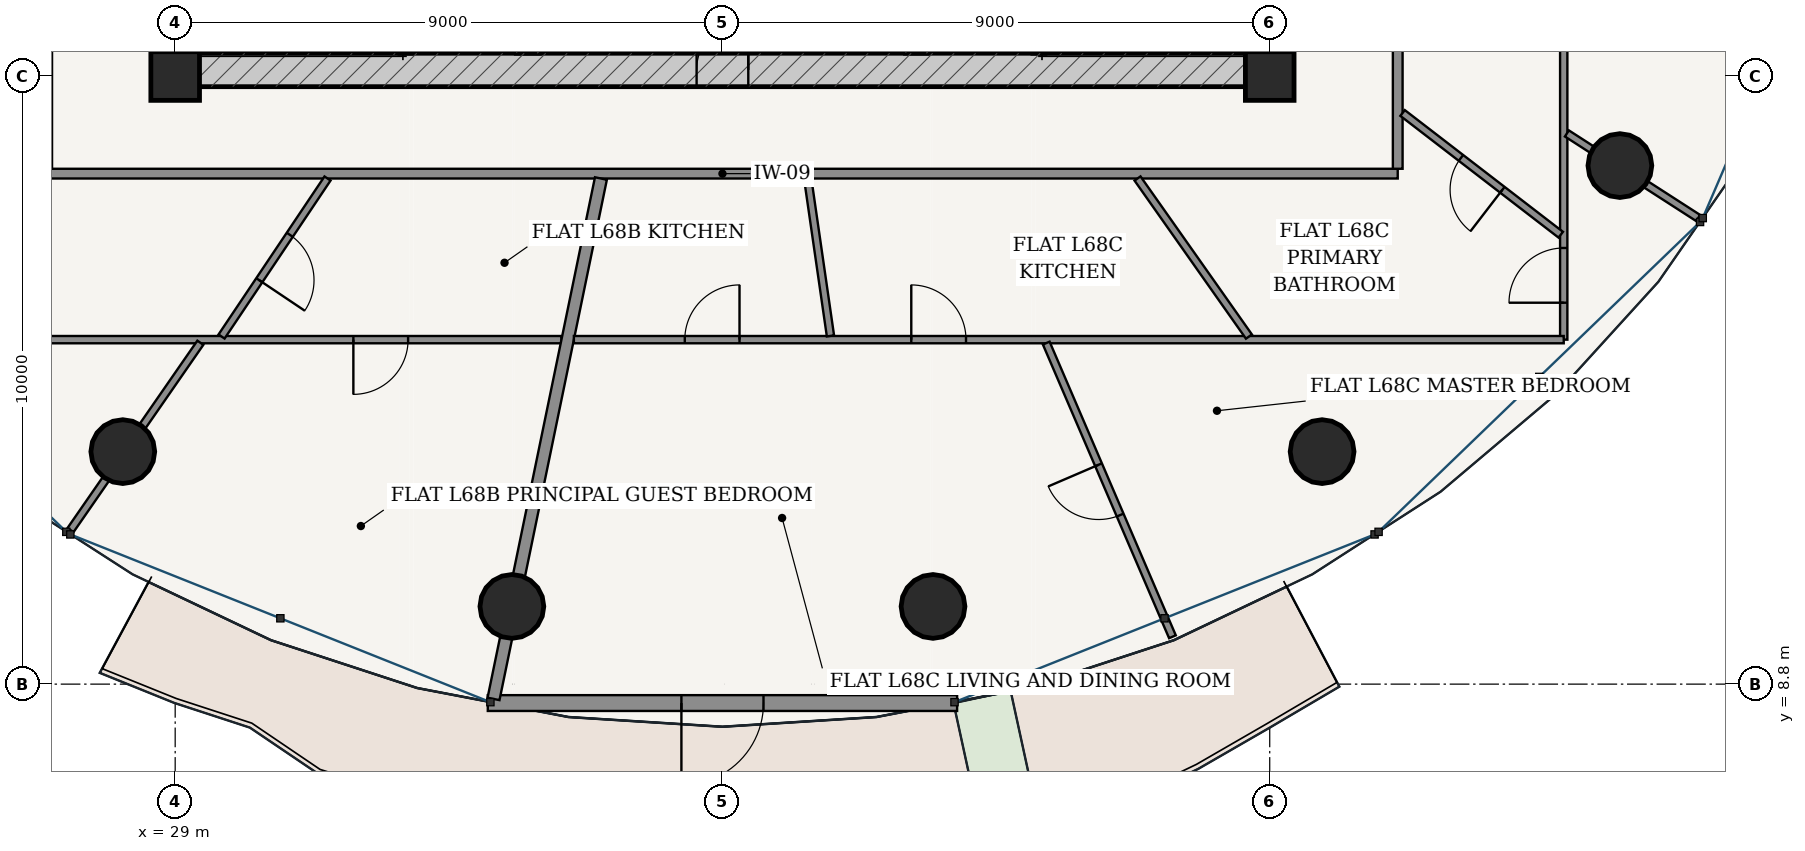
"""IFC4 building model, lengths in metres.
Left out: names, types, materials, properties, quantities, classifications, styles, units other than length and angle.
Written with IfcOpenShell. Run it as: python <this file> out.ifc"""

import sys

from ifc_helpers import new_model, si_unit, direction, frame, frame_2d, origin, origin_2d, place, context, subcontext, project, spatial, rectangle, hollow_circle, extrude, source, transform, mapped, element, fill, save


model = new_model("IFC4")
c1 = context("Model", 3, precision=1e-05, world=origin(), true_north=direction((-0.2419218956, 0.970295726276)))
c2 = subcontext(c1, "Body", "Model", "MODEL_VIEW")
j1 = project(units=[si_unit("LENGTHUNIT", "METRE"), si_unit("PLANEANGLEUNIT", "RADIAN")], contexts=[c1])
p1 = place(None, origin())
s1 = spatial("IfcSite", under=j1, at=p1, CompositionType="ELEMENT")
p2 = place(p1, origin())
s2 = spatial("IfcBuilding", under=s1, at=p2, CompositionType="ELEMENT")
p3 = place(p2, frame((0.0, 0.0, 259.45)))
s3 = spatial("IfcBuildingStorey", under=s2, at=p3, CompositionType="ELEMENT", Elevation=259.45)
for number, where, z_axis, x_axis in (
    (1, (29.0, 18.8, 0.0), (0.0, 0.0, 1.0), (1.0, 0.0, 0.0)),
    (2, (47.0, 18.8, 0.0), (0.0, 0.0, 1.0), (1.0, 0.0, 0.0)),
):
    element("IfcColumn", number, at=place(p3, frame(where, z_axis=z_axis, x_axis=x_axis)), inside=s3, PredefinedType="COLUMN", context=c2, shape_type="SweptSolid", body=[
        extrude(rectangle(XDim=0.8, YDim=0.8, at=origin_2d()), origin(), (0.0, 0.0, 1.0), 3.75),
    ])
p4 = place(p3, frame((28.825, 18.9, 0.0), z_axis=(0.0, 0.0, 1.0), x_axis=(1.0, 0.0, 0.0)))
e3 = element("IfcWall", 3, at=p4, inside=s3, PredefinedType="SHEAR", context=c2, shape_type="SweptSolid", body=[
    extrude(rectangle(XDim=18.35, YDim=0.55, at=frame_2d((9.175, 0.0))), origin(), (0.0, 0.0, 1.0), 3.49),
])
p5 = place(p4, frame((8.75, 0.0, 0.0)))
e4 = element("IfcOpeningElement", 4, at=p5, cuts=e3, PredefinedType="OPENING", context=c2, shape_type="SweptSolid", body=[
    extrude(rectangle(XDim=0.85, YDim=2.1, at=frame_2d((0.425, 1.05))), frame((0.0, 0.285, 0.0), z_axis=(0.0, -1.0, 0.0), x_axis=(1.0, 0.0, 0.0)), (0.0, 0.0, 1.0), 0.57),
])
p6 = place(p3, frame((29.1, 19.175, 0.0), z_axis=(0.0, 0.0, 1.0), x_axis=(0.0, 1.0, 0.0)))
e5 = element("IfcWall", 5, at=p6, inside=s3, PredefinedType="SHEAR", context=c2, shape_type="SweptSolid", body=[
    extrude(rectangle(XDim=15.25, YDim=0.55, at=frame_2d((7.625, 0.0))), origin(), (0.0, 0.0, 1.0), 3.49),
])
p7 = place(p6, frame((9.875, 0.0, 0.0)))
e6 = element("IfcOpeningElement", 6, at=p7, cuts=e5, PredefinedType="OPENING", context=c2, shape_type="SweptSolid", body=[
    extrude(rectangle(XDim=1.5, YDim=2.2, at=frame_2d((0.75, 1.1))), frame((0.0, 0.285, 0.0), z_axis=(0.0, -1.0, 0.0), x_axis=(1.0, 0.0, 0.0)), (0.0, 0.0, 1.0), 0.57),
])
p8 = place(p3, frame((46.9, 19.175, 0.0), z_axis=(0.0, 0.0, 1.0), x_axis=(0.0, 1.0, 0.0)))
e7 = element("IfcWall", 7, at=p8, inside=s3, PredefinedType="SHEAR", context=c2, shape_type="SweptSolid", body=[
    extrude(rectangle(XDim=15.25, YDim=0.55, at=frame_2d((7.625, 0.0))), origin(), (0.0, 0.0, 1.0), 3.49),
])
p9 = place(p8, frame((9.875, 0.0, 0.0)))
e8 = element("IfcOpeningElement", 8, at=p9, cuts=e7, PredefinedType="OPENING", context=c2, shape_type="SweptSolid", body=[
    extrude(rectangle(XDim=1.5, YDim=2.2, at=frame_2d((0.75, 1.1))), frame((0.0, 0.285, 0.0), z_axis=(0.0, -1.0, 0.0), x_axis=(1.0, 0.0, 0.0)), (0.0, 0.0, 1.0), 0.57),
])
for number, where, z_axis, x_axis in (
    (9, (32.795, 19.175, 0.0), (0.0, 0.0, 1.0), (0.0, 1.0, 0.0)),
    (10, (43.205, 19.175, 0.0), (0.0, 0.0, 1.0), (0.0, 1.0, 0.0)),
):
    element("IfcWall", number, at=place(p3, frame(where, z_axis=z_axis, x_axis=x_axis)), inside=s3, PredefinedType="SOLIDWALL", context=c2, shape_type="SweptSolid", body=[
        extrude(rectangle(XDim=7.375, YDim=0.2, at=frame_2d((3.688, 0.0))), origin(), (0.0, 0.0, 1.0), 3.49),
    ])
p10 = place(p3, frame((34.8, 19.175, 0.0), z_axis=(0.0, 0.0, 1.0), x_axis=(0.0, 1.0, 0.0)))
e11 = element("IfcWall", 11, at=p10, inside=s3, PredefinedType="SHEAR", context=c2, shape_type="SweptSolid", body=[
    extrude(rectangle(XDim=15.25, YDim=0.38, at=frame_2d((7.625, 0.0))), origin(), (0.0, 0.0, 1.0), 3.49),
])
p11 = place(p10, frame((7.8, 0.0, 0.0)))
e12 = element("IfcOpeningElement", 12, at=p11, cuts=e11, PredefinedType="OPENING", context=c2, shape_type="SweptSolid", body=[
    extrude(rectangle(XDim=1.05, YDim=2.15, at=frame_2d((0.525, 1.075))), frame((0.0, 0.2, 0.0), z_axis=(0.0, -1.0, 0.0), x_axis=(1.0, 0.0, 0.0)), (0.0, 0.0, 1.0), 0.4),
])
p12 = place(p3, frame((41.2, 19.175, 0.0), z_axis=(0.0, 0.0, 1.0), x_axis=(0.0, 1.0, 0.0)))
e13 = element("IfcWall", 13, at=p12, inside=s3, PredefinedType="SHEAR", context=c2, shape_type="SweptSolid", body=[
    extrude(rectangle(XDim=15.25, YDim=0.38, at=frame_2d((7.625, 0.0))), origin(), (0.0, 0.0, 1.0), 3.49),
])
p13 = place(p12, frame((7.8, 0.0, 0.0)))
e14 = element("IfcOpeningElement", 14, at=p13, cuts=e13, PredefinedType="OPENING", context=c2, shape_type="SweptSolid", body=[
    extrude(rectangle(XDim=1.05, YDim=2.15, at=frame_2d((0.525, 1.075))), frame((0.0, 0.2, 0.0), z_axis=(0.0, -1.0, 0.0), x_axis=(1.0, 0.0, 0.0)), (0.0, 0.0, 1.0), 0.4),
])
for number, where, z_axis, x_axis in (
    (15, (28.139, 12.624, 0.0), (0.0, 0.0, 1.0), (1.0, 0.0, 0.0)),
    (16, (34.537, 10.078, 0.0), (0.0, 0.0, 1.0), (1.0, 0.0, 0.0)),
    (17, (41.463, 10.078, 0.0), (0.0, 0.0, 1.0), (1.0, 0.0, 0.0)),
    (18, (47.861, 12.624, 0.0), (0.0, 0.0, 1.0), (1.0, 0.0, 0.0)),
    (19, (52.759, 17.328, 0.0), (0.0, 0.0, 1.0), (1.0, 0.0, 0.0)),
):
    element("IfcColumn", number, at=place(p3, frame(where, z_axis=z_axis, x_axis=x_axis)), inside=s3, PredefinedType="COLUMN", context=c2, shape_type="SweptSolid", body=[
        extrude(hollow_circle(Radius=0.525, WallThickness=0.035, at=origin_2d()), origin(), (0.0, 0.0, 1.0), 3.75),
    ])
p14 = place(p3, frame((34.141, 8.489, 0.0), z_axis=(0.0, 0.0, 1.0), x_axis=(1.0, 0.0, 0.0)))
e20 = element("IfcWall", 20, at=p14, inside=s3, PredefinedType="SOLIDWALL", context=c2, shape_type="SweptSolid", body=[
    extrude(rectangle(XDim=7.718, YDim=0.26, at=frame_2d((3.859, 0.0))), origin(), (0.0, 0.0, 1.0), 3.49),
])
p15 = place(p14, frame((3.184, 0.0, 0.0)))
e21 = element("IfcOpeningElement", 21, at=p15, cuts=e20, PredefinedType="OPENING", context=c2, shape_type="SweptSolid", body=[
    extrude(rectangle(XDim=1.35, YDim=2.2, at=frame_2d((0.675, 1.1))), frame((0.0, 0.14, 0.0), z_axis=(0.0, -1.0, 0.0), x_axis=(1.0, 0.0, 0.0)), (0.0, 0.0, 1.0), 0.28),
])
p16 = place(p3, frame((26.895, 17.195, 0.0), z_axis=(0.0, 0.0, 1.0), x_axis=(1.0, 0.0, 0.0)))
e22 = element("IfcWall", 22, at=p16, inside=s3, PredefinedType="PARTITIONING", context=c2, shape_type="SweptSolid", body=[
    extrude(rectangle(XDim=22.21, YDim=0.16, at=frame_2d((11.105, 0.0))), origin(), (0.0, 0.0, 1.0), 3.015),
])
p17 = place(p3, frame((26.895, 17.275, 0.0), z_axis=(0.0, 0.0, 1.0), x_axis=(0.0, 1.0, 0.0)))
e23 = element("IfcWall", 23, at=p17, inside=s3, PredefinedType="PARTITIONING", context=c2, shape_type="SweptSolid", body=[
    extrude(rectangle(XDim=13.925, YDim=0.16, at=frame_2d((6.962, 0.0))), origin(), (0.0, 0.0, 1.0), 3.015),
])
p18 = place(p17, frame((1.992, 0.0, 0.0)))
e24 = element("IfcOpeningElement", 24, at=p18, cuts=e23, PredefinedType="OPENING", context=c2, shape_type="SweptSolid", body=[
    extrude(rectangle(XDim=0.98, YDim=2.2, at=frame_2d((0.49, 1.1))), frame((0.0, 0.09, 0.0), z_axis=(0.0, -1.0, 0.0), x_axis=(1.0, 0.0, 0.0)), (0.0, 0.0, 1.0), 0.18),
])
p19 = place(p3, frame((49.105, 17.275, 0.0), z_axis=(0.0, 0.0, 1.0), x_axis=(0.0, 1.0, 0.0)))
e25 = element("IfcWall", 25, at=p19, inside=s3, PredefinedType="PARTITIONING", context=c2, shape_type="SweptSolid", body=[
    extrude(rectangle(XDim=13.925, YDim=0.16, at=frame_2d((6.962, 0.0))), origin(), (0.0, 0.0, 1.0), 3.015),
])
p20 = place(p19, frame((3.647, 0.0, 0.0)))
e26 = element("IfcOpeningElement", 26, at=p20, cuts=e25, PredefinedType="OPENING", context=c2, shape_type="SweptSolid", body=[
    extrude(rectangle(XDim=0.98, YDim=2.2, at=frame_2d((0.49, 1.1))), frame((0.0, 0.09, 0.0), z_axis=(0.0, -1.0, 0.0), x_axis=(1.0, 0.0, 0.0)), (0.0, 0.0, 1.0), 0.18),
])
p21 = place(p3, frame((35.353, 14.465, 0.0), z_axis=(0.0, 0.0, 1.0), x_axis=(-1.0, 0.0, 0.0)))
e27 = element("IfcWall", 27, at=p21, inside=s3, PredefinedType="PARTITIONING", context=c2, shape_type="SweptSolid", body=[
    extrude(rectangle(XDim=11.188, YDim=0.12, at=frame_2d((5.594, 0.0))), origin(), (0.0, 0.0, 1.0), 3.015),
])
p22 = place(p21, frame((2.522, 0.0, 0.0)))
e28 = element("IfcOpeningElement", 28, at=p22, cuts=e27, PredefinedType="OPENING", context=c2, shape_type="SweptSolid", body=[
    extrude(rectangle(XDim=0.9, YDim=2.15, at=frame_2d((0.45, 1.075))), frame((0.0, 0.07, 0.0), z_axis=(0.0, -1.0, 0.0), x_axis=(1.0, 0.0, 0.0)), (0.0, 0.0, 1.0), 0.14),
])
p23 = place(p3, frame((29.414, 14.414, 0.0), z_axis=(0.0, 0.0, 1.0), x_axis=(-0.569657021681, -0.821882520589, 0.0)))
e29 = element("IfcWall", 29, at=p23, inside=s3, PredefinedType="PARTITIONING", context=c2, shape_type="SweptSolid", body=[
    extrude(rectangle(XDim=3.748, YDim=0.12, at=frame_2d((1.874, 0.0))), origin(), (0.0, 0.0, 1.0), 3.015),
])
p24 = place(p3, frame((31.505, 17.115, 0.0), z_axis=(0.0, 0.0, 1.0), x_axis=(-0.557003057019, -0.83051044212, 0.0)))
e30 = element("IfcWall", 30, at=p24, inside=s3, PredefinedType="PARTITIONING", context=c2, shape_type="SweptSolid", body=[
    extrude(rectangle(XDim=3.129, YDim=0.12, at=frame_2d((1.564, 0.0))), origin(), (0.0, 0.0, 1.0), 3.209),
])
p25 = place(p24, frame((1.114, 0.0, 0.0)))
e31 = element("IfcOpeningElement", 31, at=p25, cuts=e30, PredefinedType="OPENING", context=c2, shape_type="SweptSolid", body=[
    extrude(rectangle(XDim=0.9, YDim=2.15, at=frame_2d((0.45, 1.075))), frame((0.0, 0.07, 0.0), z_axis=(0.0, -1.0, 0.0), x_axis=(1.0, 0.0, 0.0)), (0.0, 0.0, 1.0), 0.14),
])
p26 = place(p3, frame((36.001, 17.115, 0.0), z_axis=(0.0, 0.0, 1.0), x_axis=(-0.202108543081, -0.979363128167, 0.0)))
e32 = element("IfcWall", 32, at=p26, inside=s3, PredefinedType="PARTITIONING", context=c2, shape_type="SweptSolid", body=[
    extrude(rectangle(XDim=8.739, YDim=0.2, at=frame_2d((4.369, 0.0))), origin(), (0.0, 0.0, 1.0), 3.015),
])
p27 = place(p3, frame((51.835, 24.045, 0.0), z_axis=(0.0, 0.0, 1.0), x_axis=(0.0, -1.0, 0.0)))
e33 = element("IfcWall", 33, at=p27, inside=s3, PredefinedType="PARTITIONING", context=c2, shape_type="SweptSolid", body=[
    extrude(rectangle(XDim=9.58, YDim=0.12, at=frame_2d((4.79, 0.0))), origin(), (0.0, 0.0, 1.0), 3.015),
])
p28 = place(p27, frame((2.771, 0.0, 0.0)))
e34 = element("IfcOpeningElement", 34, at=p28, cuts=e33, PredefinedType="OPENING", context=c2, shape_type="SweptSolid", body=[
    extrude(rectangle(XDim=0.9, YDim=2.15, at=frame_2d((0.45, 1.075))), frame((0.0, 0.07, 0.0), z_axis=(0.0, -1.0, 0.0), x_axis=(1.0, 0.0, 0.0)), (0.0, 0.0, 1.0), 0.14),
])
p29 = place(p27, frame((8.073, 0.0, 0.0)))
e35 = element("IfcOpeningElement", 35, at=p29, cuts=e33, PredefinedType="OPENING", context=c2, shape_type="SweptSolid", body=[
    extrude(rectangle(XDim=0.9, YDim=2.15, at=frame_2d((0.45, 1.075))), frame((0.0, 0.07, 0.0), z_axis=(0.0, -1.0, 0.0), x_axis=(1.0, 0.0, 0.0)), (0.0, 0.0, 1.0), 0.14),
])
p30 = place(p3, frame((51.835, 14.465, 0.0), z_axis=(0.0, 0.0, 1.0), x_axis=(-1.0, 0.0, 0.0)))
e36 = element("IfcWall", 36, at=p30, inside=s3, PredefinedType="PARTITIONING", context=c2, shape_type="SweptSolid", body=[
    extrude(rectangle(XDim=16.278, YDim=0.12, at=frame_2d((8.139, 0.0))), origin(), (0.0, 0.0, 1.0), 3.015),
])
p31 = place(p30, frame((9.83, 0.0, 0.0)))
e37 = element("IfcOpeningElement", 37, at=p31, cuts=e36, PredefinedType="OPENING", context=c2, shape_type="SweptSolid", body=[
    extrude(rectangle(XDim=0.9, YDim=2.15, at=frame_2d((0.45, 1.075))), frame((0.0, 0.07, 0.0), z_axis=(0.0, -1.0, 0.0), x_axis=(1.0, 0.0, 0.0)), (0.0, 0.0, 1.0), 0.14),
])
p32 = place(p30, frame((13.554, 0.0, 0.0)))
e38 = element("IfcOpeningElement", 38, at=p32, cuts=e36, PredefinedType="OPENING", context=c2, shape_type="SweptSolid", body=[
    extrude(rectangle(XDim=0.9, YDim=2.15, at=frame_2d((0.45, 1.075))), frame((0.0, 0.07, 0.0), z_axis=(0.0, -1.0, 0.0), x_axis=(1.0, 0.0, 0.0)), (0.0, 0.0, 1.0), 0.14),
])
p33 = place(p3, frame((43.325, 14.408, 0.0), z_axis=(0.0, 0.0, 1.0), x_axis=(0.394816056217, -0.918760187292, 0.0)))
e39 = element("IfcWall", 39, at=p33, inside=s3, PredefinedType="PARTITIONING", context=c2, shape_type="SweptSolid", body=[
    extrude(rectangle(XDim=5.256, YDim=0.12, at=frame_2d((2.628, 0.0))), origin(), (0.0, 0.0, 1.0), 3.121),
])
p34 = place(p33, frame((2.178, 0.0, 0.0)))
e40 = element("IfcOpeningElement", 40, at=p34, cuts=e39, PredefinedType="OPENING", context=c2, shape_type="SweptSolid", body=[
    extrude(rectangle(XDim=0.9, YDim=2.15, at=frame_2d((0.45, 1.075))), frame((0.0, 0.07, 0.0), z_axis=(0.0, -1.0, 0.0), x_axis=(1.0, 0.0, 0.0)), (0.0, 0.0, 1.0), 0.14),
])
p35 = place(p3, frame((51.887, 17.856, 0.0), z_axis=(0.0, 0.0, 1.0), x_axis=(0.840708587197, -0.54148783127, 0.0)))
e41 = element("IfcWall", 41, at=p35, inside=s3, PredefinedType="PARTITIONING", context=c2, shape_type="SweptSolid", body=[
    extrude(rectangle(XDim=2.568, YDim=0.12, at=frame_2d((1.284, 0.0))), origin(), (0.0, 0.0, 1.0), 3.015),
])
p36 = place(p3, frame((39.402, 17.115, 0.0), z_axis=(0.0, 0.0, 1.0), x_axis=(0.143185278857, -0.989695900728, 0.0)))
e42 = element("IfcWall", 42, at=p36, inside=s3, PredefinedType="PARTITIONING", context=c2, shape_type="SweptSolid", body=[
    extrude(rectangle(XDim=2.615, YDim=0.12, at=frame_2d((1.308, 0.0))), origin(), (0.0, 0.0, 1.0), 3.49),
])
p37 = place(p3, frame((44.826, 17.115, 0.0), z_axis=(0.0, 0.0, 1.0), x_axis=(0.57609227969, -0.817384661761, 0.0)))
e43 = element("IfcWall", 43, at=p37, inside=s3, PredefinedType="PARTITIONING", context=c2, shape_type="SweptSolid", body=[
    extrude(rectangle(XDim=3.18, YDim=0.12, at=frame_2d((1.59, 0.0))), origin(), (0.0, 0.0, 1.0), 3.209),
])
p38 = place(p3, frame((49.185, 18.192, 0.0), z_axis=(0.0, 0.0, 1.0), x_axis=(0.792502290575, -0.609868936275, 0.0)))
e44 = element("IfcWall", 44, at=p38, inside=s3, PredefinedType="PARTITIONING", context=c2, shape_type="SweptSolid", body=[
    extrude(rectangle(XDim=3.282, YDim=0.12, at=frame_2d((1.641, 0.0))), origin(), (0.0, 0.0, 1.0), 3.121),
])
p39 = place(p38, frame((1.211, 0.0, 0.0)))
e45 = element("IfcOpeningElement", 45, at=p39, cuts=e44, PredefinedType="OPENING", context=c2, shape_type="SweptSolid", body=[
    extrude(rectangle(XDim=0.86, YDim=2.15, at=frame_2d((0.43, 1.075))), frame((0.0, 0.07, 0.0), z_axis=(0.0, -1.0, 0.0), x_axis=(1.0, 0.0, 0.0)), (0.0, 0.0, 1.0), 0.14),
])
m1 = source(origin(), c2, "Body", "SweptSolid", [
    extrude(rectangle(XDim=1.35, YDim=2.2, at=frame_2d((0.675, 1.1))), frame((0.0, 0.025, 0.0), z_axis=(0.0, -1.0, 0.0), x_axis=(1.0, 0.0, 0.0)), (0.0, 0.0, 1.0), 0.05),
])
p40 = place(p15, frame((1.35, 0.0, 0.0), z_axis=(0.0, 0.0, 1.0), x_axis=(-1.0, 0.0, 0.0)))
e46 = element("IfcDoor", 46, at=p40, inside=s3, OperationType="SINGLE_SWING_RIGHT", PredefinedType="DOOR", context=c2, shape_type="MappedRepresentation", body=[
    mapped(m1, transform((0.0, 0.0, 0.0), scale=1.0)),
])
fill(e21, e46)
m2 = source(origin(), c2, "Body", "SweptSolid", [
    extrude(rectangle(XDim=0.85, YDim=2.1, at=frame_2d((0.425, 1.05))), frame((0.0, 0.025, 0.0), z_axis=(0.0, -1.0, 0.0), x_axis=(1.0, 0.0, 0.0)), (0.0, 0.0, 1.0), 0.05),
])
p41 = place(p5, origin())
e47 = element("IfcDoor", 47, at=p41, inside=s3, OperationType="SINGLE_SWING_RIGHT", PredefinedType="DOOR", context=c2, shape_type="MappedRepresentation", body=[
    mapped(m2, transform((0.0, 0.0, 0.0), scale=1.0)),
])
fill(e4, e47)
m3 = source(origin(), c2, "Body", "SweptSolid", [
    extrude(rectangle(XDim=0.9, YDim=2.15, at=frame_2d((0.45, 1.075))), frame((0.0, 0.025, 0.0), z_axis=(0.0, -1.0, 0.0), x_axis=(1.0, 0.0, 0.0)), (0.0, 0.0, 1.0), 0.05),
])
p42 = place(p25, origin())
e48 = element("IfcDoor", 48, at=p42, inside=s3, OperationType="SINGLE_SWING_RIGHT", PredefinedType="DOOR", context=c2, shape_type="MappedRepresentation", body=[
    mapped(m3, transform((0.0, 0.0, 0.0), scale=1.0)),
])
fill(e31, e48)
p43 = place(p22, origin())
e49 = element("IfcDoor", 49, at=p43, inside=s3, OperationType="SINGLE_SWING_RIGHT", PredefinedType="DOOR", context=c2, shape_type="MappedRepresentation", body=[
    mapped(m3, transform((0.0, 0.0, 0.0), scale=1.0)),
])
fill(e28, e49)
m4 = source(origin(), c2, "Body", "SweptSolid", [
    extrude(rectangle(XDim=0.86, YDim=2.15, at=frame_2d((0.43, 1.075))), frame((0.0, 0.025, 0.0), z_axis=(0.0, -1.0, 0.0), x_axis=(1.0, 0.0, 0.0)), (0.0, 0.0, 1.0), 0.05),
])
p44 = place(p39, frame((0.86, 0.0, 0.0), z_axis=(0.0, 0.0, 1.0), x_axis=(-1.0, 0.0, 0.0)))
e50 = element("IfcDoor", 50, at=p44, inside=s3, OperationType="SINGLE_SWING_LEFT", PredefinedType="DOOR", context=c2, shape_type="MappedRepresentation", body=[
    mapped(m4, transform((0.0, 0.0, 0.0), scale=1.0)),
])
fill(e45, e50)
p45 = place(p29, frame((0.9, 0.0, 0.0), z_axis=(0.0, 0.0, 1.0), x_axis=(-1.0, 0.0, 0.0)))
e51 = element("IfcDoor", 51, at=p45, inside=s3, OperationType="SINGLE_SWING_LEFT", PredefinedType="DOOR", context=c2, shape_type="MappedRepresentation", body=[
    mapped(m3, transform((0.0, 0.0, 0.0), scale=1.0)),
])
fill(e35, e51)
p46 = place(p34, frame((0.9, 0.0, 0.0), z_axis=(0.0, 0.0, 1.0), x_axis=(-1.0, 0.0, 0.0)))
e52 = element("IfcDoor", 52, at=p46, inside=s3, OperationType="SINGLE_SWING_RIGHT", PredefinedType="DOOR", context=c2, shape_type="MappedRepresentation", body=[
    mapped(m3, transform((0.0, 0.0, 0.0), scale=1.0)),
])
fill(e40, e52)
p47 = place(p31, frame((0.9, 0.0, 0.0), z_axis=(0.0, 0.0, 1.0), x_axis=(-1.0, 0.0, 0.0)))
e53 = element("IfcDoor", 53, at=p47, inside=s3, OperationType="SINGLE_SWING_LEFT", PredefinedType="DOOR", context=c2, shape_type="MappedRepresentation", body=[
    mapped(m3, transform((0.0, 0.0, 0.0), scale=1.0)),
])
fill(e37, e53)
p48 = place(p32, frame((0.9, 0.0, 0.0), z_axis=(0.0, 0.0, 1.0), x_axis=(-1.0, 0.0, 0.0)))
e54 = element("IfcDoor", 54, at=p48, inside=s3, OperationType="SINGLE_SWING_RIGHT", PredefinedType="DOOR", context=c2, shape_type="MappedRepresentation", body=[
    mapped(m3, transform((0.0, 0.0, 0.0), scale=1.0)),
])
fill(e38, e54)
save(model, sys.argv[1])
